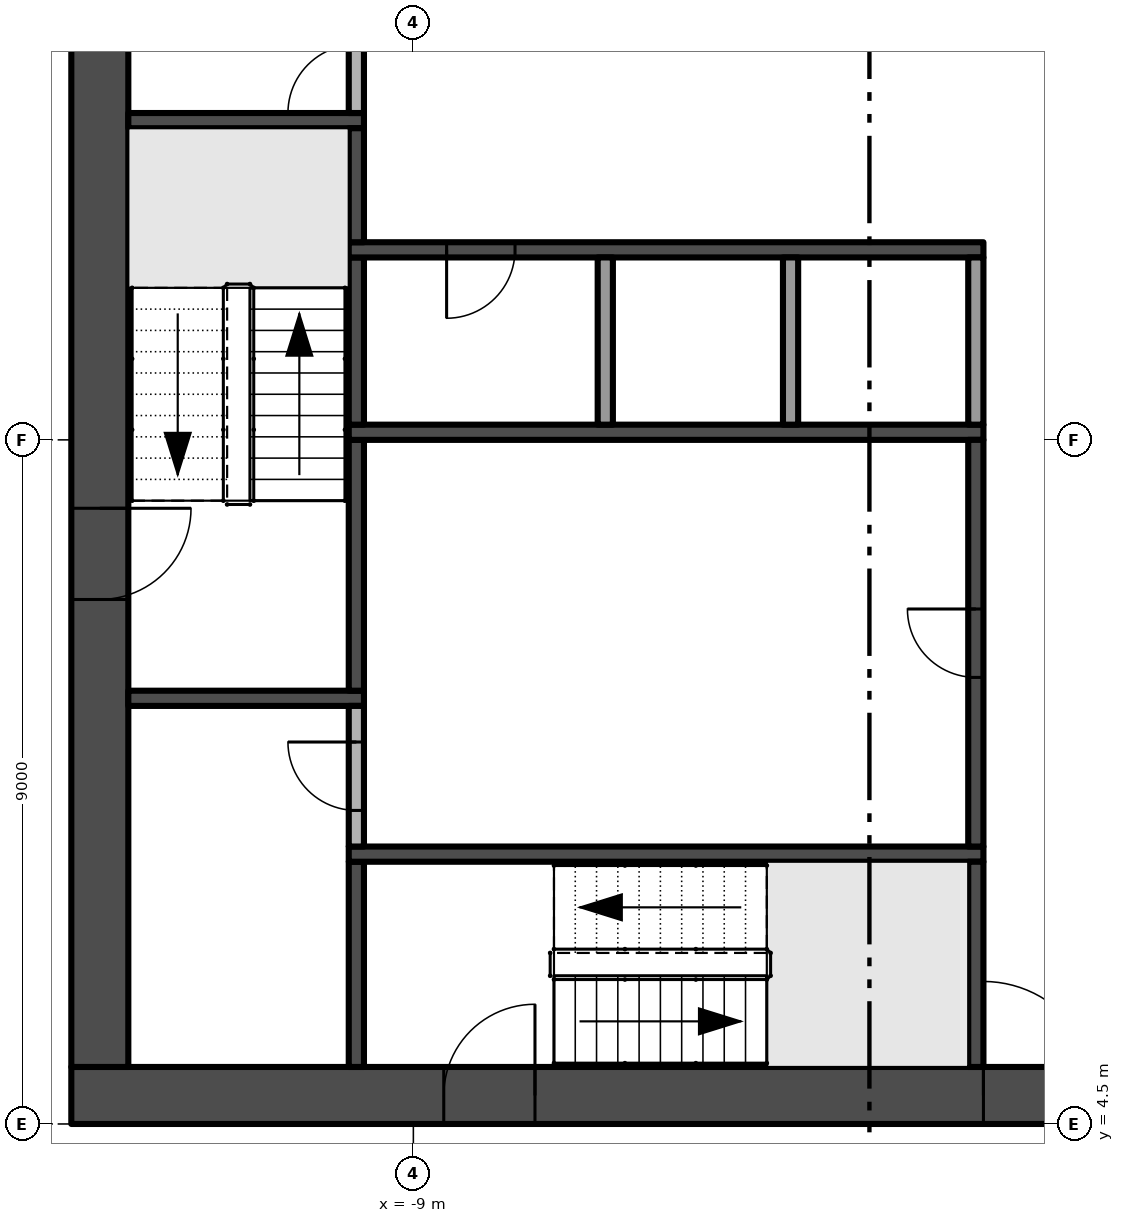
"""IFC4 building model, lengths in metres.
Left out: names, types, materials, properties, quantities, classifications, styles, units other than length and angle.
Written with IfcOpenShell. Run it as: python <this file> out.ifc"""

import sys

from ifc_helpers import new_model, si_unit, direction, frame, frame_2d, origin, place, context, subcontext, project, spatial, rectangle, extrude, element, fill, save


model = new_model("IFC4")
c1 = context("Model", 3, precision=1e-05, world=origin(), true_north=direction((0.0, 1.0)))
c2 = subcontext(c1, "Body", "Model", "MODEL_VIEW")
j1 = project(units=[si_unit("LENGTHUNIT", "METRE"), si_unit("PLANEANGLEUNIT", "RADIAN")], contexts=[c1])
p1 = place(None, origin())
s1 = spatial("IfcSite", under=j1, at=p1, CompositionType="ELEMENT")
p2 = place(p1, origin())
s2 = spatial("IfcBuilding", under=s1, at=p2, CompositionType="ELEMENT")
p3 = place(p2, frame((0.0, 0.0, 159.2)))
s3 = spatial("IfcBuildingStorey", under=s2, at=p3, CompositionType="ELEMENT", Elevation=159.2)
p4 = place(p3, frame((-13.5, 4.875, -0.3), z_axis=(0.0, 0.0, 1.0), x_axis=(1.0, 0.0, 0.0)))
e1 = element("IfcWall", 1, at=p4, inside=s3, PredefinedType="SHEAR", context=c2, shape_type="SweptSolid", body=[
    extrude(rectangle(XDim=27.0, YDim=0.75, at=frame_2d((13.5, 0.0))), origin(), (0.0, 0.0, 1.0), 3.8),
])
p5 = place(p4, frame((12.0, 0.0, 0.3)))
e2 = element("IfcOpeningElement", 2, at=p5, cuts=e1, PredefinedType="OPENING", context=c2, shape_type="SweptSolid", body=[
    extrude(rectangle(XDim=3.0, YDim=2.4, at=frame_2d((1.5, 1.2))), frame((0.0, 0.385, 0.0), z_axis=(0.0, -1.0, 0.0), x_axis=(1.0, 0.0, 0.0)), (0.0, 0.0, 1.0), 0.77),
])
p6 = place(p4, frame((4.9, 0.0, 0.3)))
e3 = element("IfcOpeningElement", 3, at=p6, cuts=e1, PredefinedType="OPENING", context=c2, shape_type="SweptSolid", body=[
    extrude(rectangle(XDim=1.2, YDim=2.2, at=frame_2d((0.6, 1.1))), frame((0.0, 0.385, 0.0), z_axis=(0.0, -1.0, 0.0), x_axis=(1.0, 0.0, 0.0)), (0.0, 0.0, 1.0), 0.77),
])
p7 = place(p4, frame((20.75, 0.0, 0.3)))
e4 = element("IfcOpeningElement", 4, at=p7, cuts=e1, PredefinedType="OPENING", context=c2, shape_type="SweptSolid", body=[
    extrude(rectangle(XDim=1.5, YDim=2.2, at=frame_2d((0.75, 1.1))), frame((0.0, 0.385, 0.0), z_axis=(0.0, -1.0, 0.0), x_axis=(1.0, 0.0, 0.0)), (0.0, 0.0, 1.0), 0.77),
])
p8 = place(p4, frame((17.4, 0.0, 0.3)))
e5 = element("IfcOpeningElement", 5, at=p8, cuts=e1, PredefinedType="OPENING", context=c2, shape_type="SweptSolid", body=[
    extrude(rectangle(XDim=1.2, YDim=2.2, at=frame_2d((0.6, 1.1))), frame((0.0, 0.385, 0.0), z_axis=(0.0, -1.0, 0.0), x_axis=(1.0, 0.0, 0.0)), (0.0, 0.0, 1.0), 0.77),
])
p9 = place(p3, frame((-13.125, 21.75, -0.3), z_axis=(0.0, 0.0, 1.0), x_axis=(0.0, -1.0, 0.0)))
e6 = element("IfcWall", 6, at=p9, inside=s3, PredefinedType="SHEAR", context=c2, shape_type="SweptSolid", body=[
    extrude(rectangle(XDim=16.5, YDim=0.75, at=frame_2d((8.25, 0.0))), origin(), (0.0, 0.0, 1.0), 3.8),
])
p10 = place(p9, frame((9.15, 0.0, 0.3)))
e7 = element("IfcOpeningElement", 7, at=p10, cuts=e6, PredefinedType="OPENING", context=c2, shape_type="SweptSolid", body=[
    extrude(rectangle(XDim=1.2, YDim=2.2, at=frame_2d((0.6, 1.1))), frame((0.0, 0.385, 0.0), z_axis=(0.0, -1.0, 0.0), x_axis=(1.0, 0.0, 0.0)), (0.0, 0.0, 1.0), 0.77),
])
for number, where, z_axis, x_axis in (
    (8, (-12.75, 10.1, 0.0), (0.0, 0.0, 1.0), (1.0, 0.0, 0.0)),
    (9, (-12.75, 17.7, 0.0), (0.0, 0.0, 1.0), (1.0, 0.0, 0.0)),
):
    element("IfcWall", number, at=place(p3, frame(where, z_axis=z_axis, x_axis=x_axis)), inside=s3, PredefinedType="SHEAR", context=c2, shape_type="SweptSolid", body=[
        extrude(rectangle(XDim=3.1, YDim=0.2, at=frame_2d((1.55, 0.0))), origin(), (0.0, 0.0, 1.0), 3.5),
    ])
p11 = place(p3, frame((-9.75, 5.25, 0.0), z_axis=(0.0, 0.0, 1.0), x_axis=(0.0, 1.0, 0.0)))
e10 = element("IfcWall", 10, at=p11, inside=s3, PredefinedType="SHEAR", context=c2, shape_type="SweptSolid", body=[
    extrude(rectangle(XDim=2.7, YDim=0.2, at=frame_2d((1.35, 0.0))), origin(), (0.0, 0.0, 1.0), 3.5),
])
p12 = place(p3, frame((-9.85, 8.05, 0.0), z_axis=(0.0, 0.0, 1.0), x_axis=(1.0, 0.0, 0.0)))
e11 = element("IfcWall", 11, at=p12, inside=s3, PredefinedType="SHEAR", context=c2, shape_type="SweptSolid", body=[
    extrude(rectangle(XDim=8.35, YDim=0.2, at=frame_2d((4.175, 0.0))), origin(), (0.0, 0.0, 1.0), 3.5),
])
p13 = place(p3, frame((-9.75, 8.15, 0.0), z_axis=(0.0, 0.0, 1.0), x_axis=(0.0, 1.0, 0.0)))
e12 = element("IfcWall", 12, at=p13, inside=s3, PredefinedType="PARTITIONING", context=c2, shape_type="SweptSolid", body=[
    extrude(rectangle(XDim=1.85, YDim=0.2, at=frame_2d((0.925, 0.0))), origin(), (0.0, 0.0, 1.0), 3.5),
])
p14 = place(p13, frame((0.475, 0.0, 0.0)))
e13 = element("IfcOpeningElement", 13, at=p14, cuts=e12, PredefinedType="OPENING", context=c2, shape_type="SweptSolid", body=[
    extrude(rectangle(XDim=0.9, YDim=2.1, at=frame_2d((0.45, 1.05))), frame((0.0, 0.11, 0.0), z_axis=(0.0, -1.0, 0.0), x_axis=(1.0, 0.0, 0.0)), (0.0, 0.0, 1.0), 0.22),
])
p15 = place(p3, frame((-9.75, 10.2, 0.0), z_axis=(0.0, 0.0, 1.0), x_axis=(0.0, 1.0, 0.0)))
e14 = element("IfcWall", 14, at=p15, inside=s3, PredefinedType="SHEAR", context=c2, shape_type="SweptSolid", body=[
    extrude(rectangle(XDim=3.3, YDim=0.2, at=frame_2d((1.65, 0.0))), origin(), (0.0, 0.0, 1.0), 3.5),
])
p16 = place(p3, frame((-9.85, 13.6, 0.0), z_axis=(0.0, 0.0, 1.0), x_axis=(1.0, 0.0, 0.0)))
e15 = element("IfcWall", 15, at=p16, inside=s3, PredefinedType="SHEAR", context=c2, shape_type="SweptSolid", body=[
    extrude(rectangle(XDim=8.35, YDim=0.2, at=frame_2d((4.175, 0.0))), origin(), (0.0, 0.0, 1.0), 3.5),
])
p17 = place(p3, frame((-9.75, 13.7, 0.0), z_axis=(0.0, 0.0, 1.0), x_axis=(0.0, 1.0, 0.0)))
e16 = element("IfcWall", 16, at=p17, inside=s3, PredefinedType="SHEAR", context=c2, shape_type="SweptSolid", body=[
    extrude(rectangle(XDim=2.2, YDim=0.2, at=frame_2d((1.1, 0.0))), origin(), (0.0, 0.0, 1.0), 3.5),
])
p18 = place(p3, frame((-1.5, 16.0, 0.0), z_axis=(0.0, 0.0, 1.0), x_axis=(-1.0, 0.0, 0.0)))
e17 = element("IfcWall", 17, at=p18, inside=s3, PredefinedType="SHEAR", context=c2, shape_type="SweptSolid", body=[
    extrude(rectangle(XDim=8.35, YDim=0.2, at=frame_2d((4.175, 0.0))), origin(), (0.0, 0.0, 1.0), 3.5),
])
p19 = place(p18, frame((6.162, 0.0, 0.0)))
e18 = element("IfcOpeningElement", 18, at=p19, cuts=e17, PredefinedType="OPENING", context=c2, shape_type="SweptSolid", body=[
    extrude(rectangle(XDim=0.9, YDim=2.1, at=frame_2d((0.45, 1.05))), frame((0.0, 0.11, 0.0), z_axis=(0.0, -1.0, 0.0), x_axis=(1.0, 0.0, 0.0)), (0.0, 0.0, 1.0), 0.22),
])
p20 = place(p3, frame((-9.75, 16.1, 0.0), z_axis=(0.0, 0.0, 1.0), x_axis=(0.0, 1.0, 0.0)))
e19 = element("IfcWall", 19, at=p20, inside=s3, PredefinedType="SHEAR", context=c2, shape_type="SweptSolid", body=[
    extrude(rectangle(XDim=1.5, YDim=0.2, at=frame_2d((0.75, 0.0))), origin(), (0.0, 0.0, 1.0), 3.5),
])
p21 = place(p3, frame((-9.75, 17.8, 0.0), z_axis=(0.0, 0.0, 1.0), x_axis=(0.0, 1.0, 0.0)))
e20 = element("IfcWall", 20, at=p21, inside=s3, PredefinedType="PARTITIONING", context=c2, shape_type="SweptSolid", body=[
    extrude(rectangle(XDim=1.4, YDim=0.2, at=frame_2d((0.7, 0.0))), origin(), (0.0, 0.0, 1.0), 3.5),
])
p22 = place(p21, origin())
e21 = element("IfcOpeningElement", 21, at=p22, cuts=e20, PredefinedType="OPENING", context=c2, shape_type="SweptSolid", body=[
    extrude(rectangle(XDim=0.9, YDim=2.1, at=frame_2d((0.45, 1.05))), frame((0.0, 0.11, 0.0), z_axis=(0.0, -1.0, 0.0), x_axis=(1.0, 0.0, 0.0)), (0.0, 0.0, 1.0), 0.22),
])
for number, where, z_axis, x_axis in (
    (22, (-6.475, 13.7, 0.0), (0.0, 0.0, 1.0), (0.0, 1.0, 0.0)),
    (23, (-4.037, 13.7, 0.0), (0.0, 0.0, 1.0), (0.0, 1.0, 0.0)),
):
    element("IfcWall", number, at=place(p3, frame(where, z_axis=z_axis, x_axis=x_axis)), inside=s3, PredefinedType="PARTITIONING", context=c2, shape_type="SweptSolid", body=[
        extrude(rectangle(XDim=2.2, YDim=0.2, at=frame_2d((1.1, 0.0))), origin(), (0.0, 0.0, 1.0), 3.5),
    ])
p23 = place(p3, frame((-1.6, 5.25, 0.0), z_axis=(0.0, 0.0, 1.0), x_axis=(0.0, 1.0, 0.0)))
e24 = element("IfcWall", 24, at=p23, inside=s3, PredefinedType="SHEAR", context=c2, shape_type="SweptSolid", body=[
    extrude(rectangle(XDim=2.7, YDim=0.2, at=frame_2d((1.35, 0.0))), origin(), (0.0, 0.0, 1.0), 3.5),
])
p24 = place(p3, frame((-1.6, 8.15, 0.0), z_axis=(0.0, 0.0, 1.0), x_axis=(0.0, 1.0, 0.0)))
e25 = element("IfcWall", 25, at=p24, inside=s3, PredefinedType="SHEAR", context=c2, shape_type="SweptSolid", body=[
    extrude(rectangle(XDim=5.35, YDim=0.2, at=frame_2d((2.675, 0.0))), origin(), (0.0, 0.0, 1.0), 3.5),
])
p25 = place(p24, frame((2.225, 0.0, 0.0)))
e26 = element("IfcOpeningElement", 26, at=p25, cuts=e25, PredefinedType="OPENING", context=c2, shape_type="SweptSolid", body=[
    extrude(rectangle(XDim=0.9, YDim=2.1, at=frame_2d((0.45, 1.05))), frame((0.0, 0.11, 0.0), z_axis=(0.0, -1.0, 0.0), x_axis=(1.0, 0.0, 0.0)), (0.0, 0.0, 1.0), 0.22),
])
p26 = place(p3, frame((-1.6, 13.7, 0.0), z_axis=(0.0, 0.0, 1.0), x_axis=(0.0, 1.0, 0.0)))
e27 = element("IfcWall", 27, at=p26, inside=s3, PredefinedType="PARTITIONING", context=c2, shape_type="SweptSolid", body=[
    extrude(rectangle(XDim=2.2, YDim=0.2, at=frame_2d((1.1, 0.0))), origin(), (0.0, 0.0, 1.0), 3.5),
])
p27 = place(p5, frame((3.0, 0.0, 0.0), z_axis=(0.0, 0.0, 1.0), x_axis=(-1.0, 0.0, 0.0)))
e28 = element("IfcDoor", 28, at=p27, inside=s3, OperationType="DOUBLE_DOOR_SINGLE_SWING", PredefinedType="DOOR", context=c2, shape_type="SweptSolid", body=[
    extrude(rectangle(XDim=3.0, YDim=2.4, at=frame_2d((1.5, 1.2))), frame((0.0, 0.025, 0.0), z_axis=(0.0, -1.0, 0.0), x_axis=(1.0, 0.0, 0.0)), (0.0, 0.0, 1.0), 0.05),
])
fill(e2, e28)
p28 = place(p10, frame((1.2, 0.0, 0.0), z_axis=(0.0, 0.0, 1.0), x_axis=(-1.0, 0.0, 0.0)))
e29 = element("IfcDoor", 29, at=p28, inside=s3, OperationType="SINGLE_SWING_RIGHT", PredefinedType="DOOR", context=c2, shape_type="SweptSolid", body=[
    extrude(rectangle(XDim=1.2, YDim=2.2, at=frame_2d((0.6, 1.1))), frame((0.0, 0.025, 0.0), z_axis=(0.0, -1.0, 0.0), x_axis=(1.0, 0.0, 0.0)), (0.0, 0.0, 1.0), 0.05),
])
fill(e7, e29)
p29 = place(p6, frame((1.2, 0.0, 0.0), z_axis=(0.0, 0.0, 1.0), x_axis=(-1.0, 0.0, 0.0)))
e30 = element("IfcDoor", 30, at=p29, inside=s3, OperationType="SINGLE_SWING_LEFT", PredefinedType="DOOR", context=c2, shape_type="SweptSolid", body=[
    extrude(rectangle(XDim=1.2, YDim=2.2, at=frame_2d((0.6, 1.1))), frame((0.0, 0.025, 0.0), z_axis=(0.0, -1.0, 0.0), x_axis=(1.0, 0.0, 0.0)), (0.0, 0.0, 1.0), 0.05),
])
fill(e3, e30)
p30 = place(p25, origin())
e31 = element("IfcDoor", 31, at=p30, inside=s3, OperationType="SINGLE_SWING_RIGHT", PredefinedType="DOOR", context=c2, shape_type="SweptSolid", body=[
    extrude(rectangle(XDim=0.9, YDim=2.1, at=frame_2d((0.45, 1.05))), frame((0.0, 0.025, 0.0), z_axis=(0.0, -1.0, 0.0), x_axis=(1.0, 0.0, 0.0)), (0.0, 0.0, 1.0), 0.05),
])
fill(e26, e31)
p31 = place(p19, origin())
e32 = element("IfcDoor", 32, at=p31, inside=s3, OperationType="SINGLE_SWING_RIGHT", PredefinedType="DOOR", context=c2, shape_type="SweptSolid", body=[
    extrude(rectangle(XDim=0.9, YDim=2.1, at=frame_2d((0.45, 1.05))), frame((0.0, 0.025, 0.0), z_axis=(0.0, -1.0, 0.0), x_axis=(1.0, 0.0, 0.0)), (0.0, 0.0, 1.0), 0.05),
])
fill(e18, e32)
p32 = place(p22, origin())
e33 = element("IfcDoor", 33, at=p32, inside=s3, OperationType="SINGLE_SWING_LEFT", PredefinedType="DOOR", context=c2, shape_type="SweptSolid", body=[
    extrude(rectangle(XDim=0.9, YDim=2.1, at=frame_2d((0.45, 1.05))), frame((0.0, 0.025, 0.0), z_axis=(0.0, -1.0, 0.0), x_axis=(1.0, 0.0, 0.0)), (0.0, 0.0, 1.0), 0.05),
])
fill(e21, e33)
p33 = place(p14, origin())
e34 = element("IfcDoor", 34, at=p33, inside=s3, OperationType="SINGLE_SWING_RIGHT", PredefinedType="DOOR", context=c2, shape_type="SweptSolid", body=[
    extrude(rectangle(XDim=0.9, YDim=2.1, at=frame_2d((0.45, 1.05))), frame((0.0, 0.025, 0.0), z_axis=(0.0, -1.0, 0.0), x_axis=(1.0, 0.0, 0.0)), (0.0, 0.0, 1.0), 0.05),
])
fill(e13, e34)
save(model, sys.argv[1])
